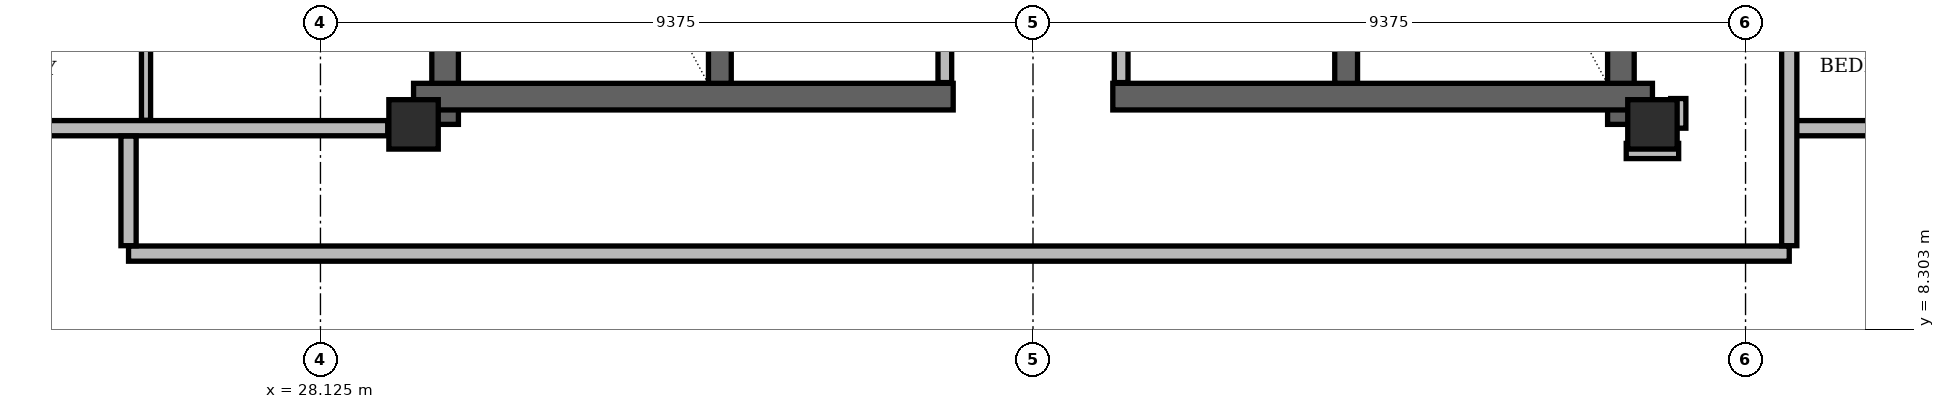
"""IFC4 building model, lengths in metres.
Left out: names, types, materials, properties, quantities, classifications, styles, units other than length and angle.
Written with IfcOpenShell. Run it as: python <this file> out.ifc"""

import sys

from ifc_helpers import new_model, si_unit, direction, frame, frame_2d, origin, origin_2d, place, context, subcontext, project, spatial, rectangle, hollow_rectangle, extrude, element, save


model = new_model("IFC4")
c1 = context("Model", 3, precision=1e-05, world=origin(), true_north=direction((0.0, 1.0)))
c2 = subcontext(c1, "Body", "Model", "MODEL_VIEW")
j1 = project(units=[si_unit("LENGTHUNIT", "METRE"), si_unit("PLANEANGLEUNIT", "RADIAN")], contexts=[c1])
p1 = place(None, origin())
s1 = spatial("IfcSite", under=j1, at=p1, CompositionType="ELEMENT")
p2 = place(p1, origin())
s2 = spatial("IfcBuilding", under=s1, at=p2, CompositionType="ELEMENT")
p3 = place(p2, frame((0.0, 0.0, 253.8)))
s3 = spatial("IfcBuildingStorey", under=s2, at=p3, CompositionType="ELEMENT", Elevation=253.8)
for number, where, z_axis, x_axis in (
    (1, (29.35, 11.0, 0.0), (0.0, 0.0, 1.0), (1.0, 0.0, 0.0)),
    (2, (45.65, 11.0, 0.0), (0.0, 0.0, 1.0), (1.0, 0.0, 0.0)),
):
    element("IfcColumn", number, at=place(p3, frame(where, z_axis=z_axis, x_axis=x_axis)), inside=s3, PredefinedType="COLUMN", context=c2, shape_type="SweptSolid", body=[
        extrude(hollow_rectangle(XDim=0.65, YDim=0.65, WallThickness=0.05, at=origin_2d()), origin(), (0.0, 0.0, 1.0), 3.9),
    ])
for number, where, z_axis, x_axis in (
    (3, (29.765, 11.0, 0.0), (0.0, 0.0, 1.0), (0.0, 1.0, 0.0)),
    (4, (45.235, 11.0, 0.0), (0.0, 0.0, 1.0), (0.0, 1.0, 0.0)),
):
    element("IfcWall", number, at=place(p3, frame(where, z_axis=z_axis, x_axis=x_axis)), inside=s3, PredefinedType="SHEAR", context=c2, shape_type="SweptSolid", body=[
        extrude(rectangle(XDim=13.3, YDim=0.35, at=frame_2d((6.65, 0.0))), origin(), (0.0, 0.0, 1.0), 3.68),
    ])
for number, where, z_axis, x_axis in (
    (5, (29.35, 11.365, 0.0), (0.0, 0.0, 1.0), (1.0, 0.0, 0.0)),
    (6, (38.55, 11.365, 0.0), (0.0, 0.0, 1.0), (1.0, 0.0, 0.0)),
):
    element("IfcWall", number, at=place(p3, frame(where, z_axis=z_axis, x_axis=x_axis)), inside=s3, PredefinedType="SHEAR", context=c2, shape_type="SweptSolid", body=[
        extrude(rectangle(XDim=7.1, YDim=0.35, at=frame_2d((3.55, 0.0))), origin(), (0.0, 0.0, 1.0), 3.68),
    ])
for number, where, z_axis, x_axis in (
    (7, (33.38, 11.54, 0.0), (0.0, 0.0, 1.0), (0.0, 1.0, 0.0)),
    (8, (41.62, 11.54, 0.0), (0.0, 0.0, 1.0), (0.0, 1.0, 0.0)),
):
    element("IfcWall", number, at=place(p3, frame(where, z_axis=z_axis, x_axis=x_axis)), inside=s3, PredefinedType="SHEAR", context=c2, shape_type="SweptSolid", body=[
        extrude(rectangle(XDim=7.62, YDim=0.3, at=frame_2d((3.81, 0.0))), origin(), (0.0, 0.0, 1.0), 3.68),
    ])
p4 = place(p3, frame((58.733, 10.938, 0.0), z_axis=(0.0, 0.0, 1.0), x_axis=(-0.500001745664, 0.866024395923, 0.0)))
e9 = element("IfcWall", 9, at=p4, inside=s3, PredefinedType="SOLIDWALL", context=c2, shape_type="SweptSolid", body=[
    extrude(rectangle(XDim=37.102, YDim=0.29, at=frame_2d((18.551, 0.0))), origin(), (0.0, 0.0, 1.0), 3.058),
])
p5 = place(p4, frame((8.034, 0.0, 0.0)))
e10 = element("IfcOpeningElement", 10, at=p5, cuts=e9, PredefinedType="OPENING", context=c2, shape_type="SweptSolid", body=[
    extrude(rectangle(XDim=1.5, YDim=2.2, at=frame_2d((0.75, 1.1))), frame((0.0, 0.145, 0.0), z_axis=(0.0, -1.0, 0.0), x_axis=(1.0, 0.0, 0.0)), (0.0, 0.0, 1.0), 0.29),
])
p6 = place(p4, frame((31.963, 0.0, 0.0)))
e11 = element("IfcOpeningElement", 11, at=p6, cuts=e9, PredefinedType="OPENING", context=c2, shape_type="SweptSolid", body=[
    extrude(rectangle(XDim=1.5, YDim=2.2, at=frame_2d((0.75, 1.1))), frame((0.0, 0.145, 0.0), z_axis=(0.0, -1.0, 0.0), x_axis=(1.0, 0.0, 0.0)), (0.0, 0.0, 1.0), 0.29),
])
p7 = place(p4, frame((12.245, 0.0, 0.85)))
e12 = element("IfcOpeningElement", 12, at=p7, cuts=e9, PredefinedType="OPENING", context=c2, shape_type="SweptSolid", body=[
    extrude(rectangle(XDim=2.6, YDim=1.95, at=frame_2d((1.3, 0.975))), frame((0.0, 0.145, 0.0), z_axis=(0.0, -1.0, 0.0), x_axis=(1.0, 0.0, 0.0)), (0.0, 0.0, 1.0), 0.29),
])
p8 = place(p4, frame((1.081, 0.0, 0.85)))
e13 = element("IfcOpeningElement", 13, at=p8, cuts=e9, PredefinedType="OPENING", context=c2, shape_type="SweptSolid", body=[
    extrude(rectangle(XDim=2.4, YDim=1.9, at=frame_2d((1.2, 0.95))), frame((0.0, 0.145, 0.0), z_axis=(0.0, -1.0, 0.0), x_axis=(1.0, 0.0, 0.0)), (0.0, 0.0, 1.0), 0.29),
])
p9 = place(p4, frame((28.842, 0.0, 0.85)))
e14 = element("IfcOpeningElement", 14, at=p9, cuts=e9, PredefinedType="OPENING", context=c2, shape_type="SweptSolid", body=[
    extrude(rectangle(XDim=1.2, YDim=1.48, at=frame_2d((0.6, 0.74))), frame((0.0, 0.145, 0.0), z_axis=(0.0, -1.0, 0.0), x_axis=(1.0, 0.0, 0.0)), (0.0, 0.0, 1.0), 0.29),
])
p10 = place(p4, frame((34.409, 0.0, 0.85)))
e15 = element("IfcOpeningElement", 15, at=p10, cuts=e9, PredefinedType="OPENING", context=c2, shape_type="SweptSolid", body=[
    extrude(rectangle(XDim=1.2, YDim=1.48, at=frame_2d((0.6, 0.74))), frame((0.0, 0.145, 0.0), z_axis=(0.0, -1.0, 0.0), x_axis=(1.0, 0.0, 0.0)), (0.0, 0.0, 1.0), 0.29),
])
p11 = place(p4, frame((15.882, 0.0, 0.85)))
e16 = element("IfcOpeningElement", 16, at=p11, cuts=e9, PredefinedType="OPENING", context=c2, shape_type="SweptSolid", body=[
    extrude(rectangle(XDim=1.2, YDim=1.48, at=frame_2d((0.6, 0.74))), frame((0.0, 0.145, 0.0), z_axis=(0.0, -1.0, 0.0), x_axis=(1.0, 0.0, 0.0)), (0.0, 0.0, 1.0), 0.29),
])
p12 = place(p4, frame((23.379, 0.0, 0.85)))
e17 = element("IfcOpeningElement", 17, at=p12, cuts=e9, PredefinedType="OPENING", context=c2, shape_type="SweptSolid", body=[
    extrude(rectangle(XDim=1.2, YDim=1.48, at=frame_2d((0.6, 0.74))), frame((0.0, 0.145, 0.0), z_axis=(0.0, -1.0, 0.0), x_axis=(1.0, 0.0, 0.0)), (0.0, 0.0, 1.0), 0.29),
])
p13 = place(p3, frame((34.818, 43.07, 0.0), z_axis=(0.0, 0.0, 1.0), x_axis=(-0.500001745664, -0.866024395923, 0.0)))
e18 = element("IfcWall", 18, at=p13, inside=s3, PredefinedType="SOLIDWALL", context=c2, shape_type="SweptSolid", body=[
    extrude(rectangle(XDim=37.102, YDim=0.29, at=frame_2d((18.551, 0.0))), origin(), (0.0, 0.0, 1.0), 3.058),
])
p14 = place(p13, frame((8.034, 0.0, 0.0)))
e19 = element("IfcOpeningElement", 19, at=p14, cuts=e18, PredefinedType="OPENING", context=c2, shape_type="SweptSolid", body=[
    extrude(rectangle(XDim=1.5, YDim=2.2, at=frame_2d((0.75, 1.1))), frame((0.0, 0.145, 0.0), z_axis=(0.0, -1.0, 0.0), x_axis=(1.0, 0.0, 0.0)), (0.0, 0.0, 1.0), 0.29),
])
p15 = place(p13, frame((28.813, 0.0, 0.0)))
e20 = element("IfcOpeningElement", 20, at=p15, cuts=e18, PredefinedType="OPENING", context=c2, shape_type="SweptSolid", body=[
    extrude(rectangle(XDim=1.5, YDim=2.2, at=frame_2d((0.75, 1.1))), frame((0.0, 0.145, 0.0), z_axis=(0.0, -1.0, 0.0), x_axis=(1.0, 0.0, 0.0)), (0.0, 0.0, 1.0), 0.29),
])
p16 = place(p13, frame((22.792, 0.0, 0.85)))
e21 = element("IfcOpeningElement", 21, at=p16, cuts=e18, PredefinedType="OPENING", context=c2, shape_type="SweptSolid", body=[
    extrude(rectangle(XDim=1.6, YDim=1.7, at=frame_2d((0.8, 0.85))), frame((0.0, 0.145, 0.0), z_axis=(0.0, -1.0, 0.0), x_axis=(1.0, 0.0, 0.0)), (0.0, 0.0, 1.0), 0.29),
])
p17 = place(p13, frame((34.406, 0.0, 0.85)))
e22 = element("IfcOpeningElement", 22, at=p17, cuts=e18, PredefinedType="OPENING", context=c2, shape_type="SweptSolid", body=[
    extrude(rectangle(XDim=1.4, YDim=1.6, at=frame_2d((0.7, 0.8))), frame((0.0, 0.145, 0.0), z_axis=(0.0, -1.0, 0.0), x_axis=(1.0, 0.0, 0.0)), (0.0, 0.0, 1.0), 0.29),
])
p18 = place(p13, frame((17.801, 0.0, 0.85)))
e23 = element("IfcOpeningElement", 23, at=p18, cuts=e18, PredefinedType="OPENING", context=c2, shape_type="SweptSolid", body=[
    extrude(rectangle(XDim=1.2, YDim=1.48, at=frame_2d((0.6, 0.74))), frame((0.0, 0.145, 0.0), z_axis=(0.0, -1.0, 0.0), x_axis=(1.0, 0.0, 0.0)), (0.0, 0.0, 1.0), 0.29),
])
p19 = place(p13, frame((1.293, 0.0, 0.85)))
e24 = element("IfcOpeningElement", 24, at=p19, cuts=e18, PredefinedType="OPENING", context=c2, shape_type="SweptSolid", body=[
    extrude(rectangle(XDim=1.6, YDim=1.7, at=frame_2d((0.8, 0.85))), frame((0.0, 0.145, 0.0), z_axis=(0.0, -1.0, 0.0), x_axis=(1.0, 0.0, 0.0)), (0.0, 0.0, 1.0), 0.29),
])
p20 = place(p3, frame((36.34, 11.55, 0.0), z_axis=(0.0, 0.0, 1.0), x_axis=(0.0, 1.0, 0.0)))
e25 = element("IfcWall", 25, at=p20, inside=s3, PredefinedType="PARTITIONING", context=c2, shape_type="SweptSolid", body=[
    extrude(rectangle(XDim=5.55, YDim=0.18, at=frame_2d((2.775, 0.0))), origin(), (0.0, 0.0, 1.0), 3.68),
])
p21 = place(p20, frame((2.85, 0.0, 0.0)))
e26 = element("IfcOpeningElement", 26, at=p21, cuts=e25, PredefinedType="OPENING", context=c2, shape_type="SweptSolid", body=[
    extrude(rectangle(XDim=0.95, YDim=2.1, at=frame_2d((0.475, 1.05))), frame((0.0, 0.09, 0.0), z_axis=(0.0, -1.0, 0.0), x_axis=(1.0, 0.0, 0.0)), (0.0, 0.0, 1.0), 0.18),
])
p22 = place(p3, frame((38.66, 11.55, 0.0), z_axis=(0.0, 0.0, 1.0), x_axis=(0.0, 1.0, 0.0)))
e27 = element("IfcWall", 27, at=p22, inside=s3, PredefinedType="PARTITIONING", context=c2, shape_type="SweptSolid", body=[
    extrude(rectangle(XDim=5.55, YDim=0.18, at=frame_2d((2.775, 0.0))), origin(), (0.0, 0.0, 1.0), 3.68),
])
p23 = place(p22, frame((3.15, 0.0, 0.0)))
e28 = element("IfcOpeningElement", 28, at=p23, cuts=e27, PredefinedType="OPENING", context=c2, shape_type="SweptSolid", body=[
    extrude(rectangle(XDim=0.95, YDim=2.1, at=frame_2d((0.475, 1.05))), frame((0.0, 0.09, 0.0), z_axis=(0.0, -1.0, 0.0), x_axis=(1.0, 0.0, 0.0)), (0.0, 0.0, 1.0), 0.18),
])
p24 = place(p3, frame((25.6, 9.3, 0.0), z_axis=(0.0, 0.0, 1.0), x_axis=(1.0, 0.0, 0.0)))
e29 = element("IfcWall", 29, at=p24, inside=s3, PredefinedType="PARTITIONING", context=c2, shape_type="SweptSolid", body=[
    extrude(rectangle(XDim=21.85, YDim=0.2, at=frame_2d((10.925, 0.0))), origin(), (0.0, 0.0, 1.0), 3.266),
])
p25 = place(p3, frame((45.305, 10.65, 0.0), z_axis=(0.0, 0.0, 1.0), x_axis=(1.0, 0.0, 0.0)))
e30 = element("IfcWall", 30, at=p25, inside=s3, PredefinedType="PARTITIONING", context=c2, shape_type="SweptSolid", body=[
    extrude(rectangle(XDim=0.69, YDim=0.2, at=frame_2d((0.345, 0.0))), origin(), (0.0, 0.0, 1.0), 3.68),
])
p26 = place(p3, frame((16.602, 10.95, 0.0), z_axis=(0.0, 0.0, 1.0), x_axis=(1.0, 0.0, 0.0)))
e31 = element("IfcWall", 31, at=p26, inside=s3, PredefinedType="PARTITIONING", context=c2, shape_type="SweptSolid", body=[
    extrude(rectangle(XDim=12.408, YDim=0.2, at=frame_2d((6.204, 0.0))), origin(), (0.0, 0.0, 1.0), 3.266),
])
p27 = place(p3, frame((47.45, 10.95, 0.0), z_axis=(0.0, 0.0, 1.0), x_axis=(1.0, 0.0, 0.0)))
e32 = element("IfcWall", 32, at=p27, inside=s3, PredefinedType="PARTITIONING", context=c2, shape_type="SweptSolid", body=[
    extrude(rectangle(XDim=10.948, YDim=0.2, at=frame_2d((5.474, 0.0))), origin(), (0.0, 0.0, 1.0), 3.266),
])
p28 = place(p3, frame((25.6, 9.404, 0.0), z_axis=(0.0, 0.0, 1.0), x_axis=(0.0, 1.0, 0.0)))
e33 = element("IfcWall", 33, at=p28, inside=s3, PredefinedType="PARTITIONING", context=c2, shape_type="SweptSolid", body=[
    extrude(rectangle(XDim=1.442, YDim=0.2, at=frame_2d((0.721, 0.0))), origin(), (0.0, 0.0, 1.0), 3.68),
])
p29 = place(p3, frame((25.83, 11.054, 0.0), z_axis=(0.0, 0.0, 1.0), x_axis=(0.0, 1.0, 0.0)))
e34 = element("IfcWall", 34, at=p29, inside=s3, PredefinedType="PARTITIONING", context=c2, shape_type="SweptSolid", body=[
    extrude(rectangle(XDim=2.922, YDim=0.12, at=frame_2d((1.461, 0.0))), origin(), (0.0, 0.0, 1.0), 3.68),
])
p30 = place(p3, frame((45.99, 10.95, 0.0), z_axis=(0.0, 0.0, 1.0), x_axis=(0.0, 1.0, 0.0)))
e35 = element("IfcWall", 35, at=p30, inside=s3, PredefinedType="PARTITIONING", context=c2, shape_type="SweptSolid", body=[
    extrude(rectangle(XDim=0.39, YDim=0.2, at=frame_2d((0.195, 0.0))), origin(), (0.0, 0.0, 1.0), 3.266),
])
p31 = place(p3, frame((47.45, 9.404, 0.0), z_axis=(0.0, 0.0, 1.0), x_axis=(0.0, 1.0, 0.0)))
e36 = element("IfcWall", 36, at=p31, inside=s3, PredefinedType="PARTITIONING", context=c2, shape_type="SweptSolid", body=[
    extrude(rectangle(XDim=16.462, YDim=0.2, at=frame_2d((8.231, 0.0))), origin(), (0.0, 0.0, 1.0), 3.266),
])
p32 = place(p31, frame((9.32, 0.0, 0.0)))
e37 = element("IfcOpeningElement", 37, at=p32, cuts=e36, PredefinedType="OPENING", context=c2, shape_type="SweptSolid", body=[
    extrude(rectangle(XDim=1.0, YDim=2.18, at=frame_2d((0.5, 1.09))), frame((0.0, 0.1, 0.0), z_axis=(0.0, -1.0, 0.0), x_axis=(1.0, 0.0, 0.0)), (0.0, 0.0, 1.0), 0.2),
])
save(model, sys.argv[1])
